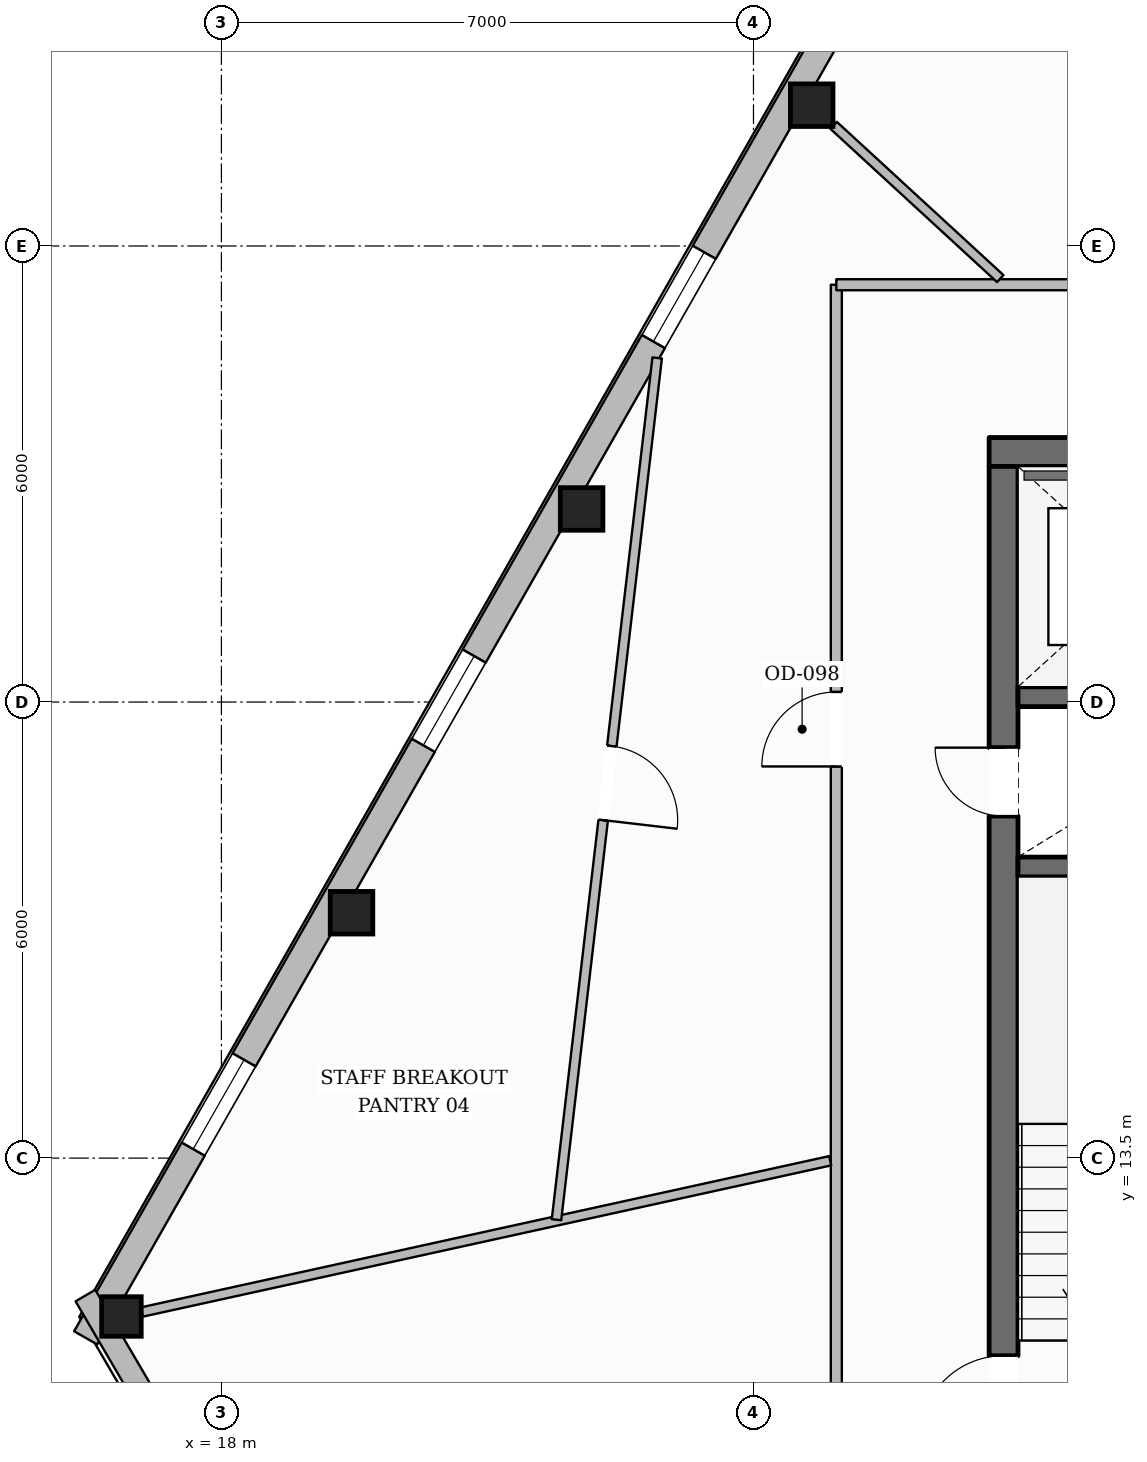
"""IFC4 building model, lengths in metres.
Left out: names, types, materials, properties, quantities, classifications, styles, units other than length and angle.
Written with IfcOpenShell. Run it as: python <this file> out.ifc"""

import sys

from ifc_helpers import new_model, si_unit, direction, frame, frame_2d, origin, origin_2d, place, context, subcontext, project, spatial, rectangle, hollow_rectangle, extrude, element, fill, save


model = new_model("IFC4")
c1 = context("Model", 3, precision=1e-05, world=origin(), true_north=direction((0.0, 1.0)))
c2 = subcontext(c1, "Body", "Model", "MODEL_VIEW")
j1 = project(units=[si_unit("LENGTHUNIT", "METRE"), si_unit("PLANEANGLEUNIT", "RADIAN")], contexts=[c1])
p1 = place(None, origin())
s1 = spatial("IfcSite", under=j1, at=p1, CompositionType="ELEMENT")
p2 = place(p1, origin())
s2 = spatial("IfcBuilding", under=s1, at=p2, CompositionType="ELEMENT")
p3 = place(p2, frame((0.0, 0.0, 251.05)))
s3 = spatial("IfcBuildingStorey", under=s2, at=p3, CompositionType="ELEMENT", Elevation=251.05)
p4 = place(p3, frame((28.1, 22.79, 0.0), z_axis=(0.0, 0.0, 1.0), x_axis=(1.0, 0.0, 0.0)))
e1 = element("IfcWall", 1, at=p4, inside=s3, PredefinedType="SOLIDWALL", context=c2, shape_type="SweptSolid", body=[
    extrude(rectangle(XDim=19.8, YDim=0.38, at=frame_2d((9.9, 0.0))), origin(), (0.0, 0.0, 1.0), 3.61),
])
p5 = place(p4, frame((6.175, 0.0, 0.0)))
e2 = element("IfcOpeningElement", 2, at=p5, cuts=e1, PredefinedType="OPENING", context=c2, shape_type="SweptSolid", body=[
    extrude(rectangle(XDim=1.05, YDim=2.15, at=frame_2d((0.525, 1.075))), frame((0.0, 0.2, 0.0), z_axis=(0.0, -1.0, 0.0), x_axis=(1.0, 0.0, 0.0)), (0.0, 0.0, 1.0), 0.4),
])
p6 = place(p4, frame((12.575, 0.0, 0.0)))
e3 = element("IfcOpeningElement", 3, at=p6, cuts=e1, PredefinedType="OPENING", context=c2, shape_type="SweptSolid", body=[
    extrude(rectangle(XDim=1.05, YDim=2.15, at=frame_2d((0.525, 1.075))), frame((0.0, 0.2, 0.0), z_axis=(0.0, -1.0, 0.0), x_axis=(1.0, 0.0, 0.0)), (0.0, 0.0, 1.0), 0.4),
])
p7 = place(p3, frame((28.29, 9.6, 0.0), z_axis=(0.0, 0.0, 1.0), x_axis=(0.0, 1.0, 0.0)))
e4 = element("IfcWall", 4, at=p7, inside=s3, PredefinedType="SOLIDWALL", context=c2, shape_type="SweptSolid", body=[
    extrude(rectangle(XDim=13.0, YDim=0.38, at=frame_2d((6.5, 0.0))), origin(), (0.0, 0.0, 1.0), 3.61),
])
p8 = place(p7, frame((0.2, 0.0, 0.0)))
e5 = element("IfcOpeningElement", 5, at=p8, cuts=e4, PredefinedType="OPENING", context=c2, shape_type="SweptSolid", body=[
    extrude(rectangle(XDim=1.1, YDim=2.15, at=frame_2d((0.55, 1.075))), frame((0.0, 0.2, 0.0), z_axis=(0.0, -1.0, 0.0), x_axis=(1.0, 0.0, 0.0)), (0.0, 0.0, 1.0), 0.4),
])
p9 = place(p7, frame((8.4, 0.0, 0.0)))
e6 = element("IfcOpeningElement", 6, at=p9, cuts=e4, PredefinedType="OPENING", context=c2, shape_type="SweptSolid", body=[
    extrude(rectangle(XDim=0.9, YDim=2.1, at=frame_2d((0.45, 1.05))), frame((0.0, 0.2, 0.0), z_axis=(0.0, -1.0, 0.0), x_axis=(1.0, 0.0, 0.0)), (0.0, 0.0, 1.0), 0.4),
])
for number, where, z_axis, x_axis in (
    (7, (28.48, 17.33, 0.0), (0.0, 0.0, 1.0), (1.0, 0.0, 0.0)),
    (8, (28.48, 19.57, 0.0), (0.0, 0.0, 1.0), (1.0, 0.0, 0.0)),
):
    element("IfcWall", number, at=place(p3, frame(where, z_axis=z_axis, x_axis=x_axis)), inside=s3, PredefinedType="SHEAR", context=c2, shape_type="SweptSolid", body=[
        extrude(rectangle(XDim=3.2, YDim=0.26, at=frame_2d((1.6, 0.0))), origin(), (0.0, 0.0, 1.0), 3.61),
    ])
for number, where, z_axis, x_axis in (
    (9, (25.766, 27.352, 0.0), (0.0, 0.0, 1.0), (1.0, 0.0, 0.0)),
    (10, (22.739, 22.04, 0.0), (0.0, 0.0, 1.0), (1.0, 0.0, 0.0)),
    (11, (19.712, 16.728, 0.0), (0.0, 0.0, 1.0), (1.0, 0.0, 0.0)),
):
    element("IfcColumn", number, at=place(p3, frame(where, z_axis=z_axis, x_axis=x_axis)), inside=s3, PredefinedType="COLUMN", context=c2, shape_type="SweptSolid", body=[
        extrude(hollow_rectangle(XDim=0.56, YDim=0.56, WallThickness=0.025, at=origin_2d()), origin(), (0.0, 0.0, 1.0), 3.61),
    ])
p10 = place(p3, frame((16.685, 11.416, 0.0), z_axis=(0.0, 0.0, 1.0), x_axis=(1.0, 0.0, 0.0)))
e12 = element("IfcColumn", 12, at=p10, inside=s3, PredefinedType="COLUMN", context=c2, shape_type="SweptSolid", body=[
    extrude(hollow_rectangle(XDim=0.52, YDim=0.52, WallThickness=0.024, at=origin_2d()), origin(), (0.0, 0.0, 1.0), 3.61),
])
p11 = place(p3, frame((16.214, 11.135, 0.0), z_axis=(0.0, 0.0, 1.0), x_axis=(0.49510347201, 0.868834018673, 0.0)))
e13 = element("IfcWall", 13, at=p11, inside=s3, PredefinedType="STANDARD", context=c2, shape_type="SweptSolid", body=[
    extrude(rectangle(XDim=37.643, YDim=0.35, at=frame_2d((18.822, 0.0))), origin(), (0.0, 0.0, 1.0), 3.196),
])
p12 = place(p11, frame((33.429, 0.0, 0.65)))
e14 = element("IfcOpeningElement", 14, at=p12, cuts=e13, PredefinedType="OPENING", context=c2, shape_type="SweptSolid", body=[
    extrude(rectangle(XDim=1.35, YDim=1.75, at=frame_2d((0.675, 0.875))), frame((0.0, 0.185, 0.0), z_axis=(0.0, -1.0, 0.0), x_axis=(1.0, 0.0, 0.0)), (0.0, 0.0, 1.0), 0.37),
])
p13 = place(p11, frame((27.315, 0.0, 0.65)))
e15 = element("IfcOpeningElement", 15, at=p13, cuts=e13, PredefinedType="OPENING", context=c2, shape_type="SweptSolid", body=[
    extrude(rectangle(XDim=1.35, YDim=1.75, at=frame_2d((0.675, 0.875))), frame((0.0, 0.185, 0.0), z_axis=(0.0, -1.0, 0.0), x_axis=(1.0, 0.0, 0.0)), (0.0, 0.0, 1.0), 0.37),
])
p14 = place(p11, frame((15.087, 0.0, 0.65)))
e16 = element("IfcOpeningElement", 16, at=p14, cuts=e13, PredefinedType="OPENING", context=c2, shape_type="SweptSolid", body=[
    extrude(rectangle(XDim=1.35, YDim=1.75, at=frame_2d((0.675, 0.875))), frame((0.0, 0.185, 0.0), z_axis=(0.0, -1.0, 0.0), x_axis=(1.0, 0.0, 0.0)), (0.0, 0.0, 1.0), 0.37),
])
p15 = place(p11, frame((8.973, 0.0, 0.65)))
e17 = element("IfcOpeningElement", 17, at=p15, cuts=e13, PredefinedType="OPENING", context=c2, shape_type="SweptSolid", body=[
    extrude(rectangle(XDim=1.35, YDim=1.75, at=frame_2d((0.675, 0.875))), frame((0.0, 0.185, 0.0), z_axis=(0.0, -1.0, 0.0), x_axis=(1.0, 0.0, 0.0)), (0.0, 0.0, 1.0), 0.37),
])
p16 = place(p11, frame((2.859, 0.0, 0.65)))
e18 = element("IfcOpeningElement", 18, at=p16, cuts=e13, PredefinedType="OPENING", context=c2, shape_type="SweptSolid", body=[
    extrude(rectangle(XDim=1.35, YDim=1.75, at=frame_2d((0.675, 0.875))), frame((0.0, 0.185, 0.0), z_axis=(0.0, -1.0, 0.0), x_axis=(1.0, 0.0, 0.0)), (0.0, 0.0, 1.0), 0.37),
])
p17 = place(p3, frame((19.979, 5.248, 0.0), z_axis=(0.0, 0.0, 1.0), x_axis=(-0.50480008765, 0.863236277915, 0.0)))
e19 = element("IfcWall", 19, at=p17, inside=s3, PredefinedType="STANDARD", context=c2, shape_type="SweptSolid", body=[
    extrude(rectangle(XDim=7.464, YDim=0.3, at=frame_2d((3.732, 0.0))), origin(), (0.0, 0.0, 1.0), 3.196),
])
p18 = place(p17, frame((3.207, 0.0, 0.65)))
e20 = element("IfcOpeningElement", 20, at=p18, cuts=e19, PredefinedType="OPENING", context=c2, shape_type="SweptSolid", body=[
    extrude(rectangle(XDim=1.05, YDim=1.7, at=frame_2d((0.525, 0.85))), frame((0.0, 0.16, 0.0), z_axis=(0.0, -1.0, 0.0), x_axis=(1.0, 0.0, 0.0)), (0.0, 0.0, 1.0), 0.32),
])
p19 = place(p3, frame((26.09, 7.21, 0.0), z_axis=(0.0, 0.0, 1.0), x_axis=(0.0, 1.0, 0.0)))
e21 = element("IfcWall", 21, at=p19, inside=s3, PredefinedType="PARTITIONING", context=c2, shape_type="SweptSolid", body=[
    extrude(rectangle(XDim=17.78, YDim=0.145, at=frame_2d((8.89, 0.0))), origin(), (0.0, 0.0, 1.0), 3.349),
])
p20 = place(p19, frame((11.443, 0.0, 0.0)))
e22 = element("IfcOpeningElement", 22, at=p20, cuts=e21, PredefinedType="OPENING", context=c2, shape_type="SweptSolid", body=[
    extrude(rectangle(XDim=0.98, YDim=2.15, at=frame_2d((0.49, 1.075))), frame((0.0, 0.083, 0.0), z_axis=(0.0, -1.0, 0.0), x_axis=(1.0, 0.0, 0.0)), (0.0, 0.0, 1.0), 0.165),
])
p21 = place(p3, frame((26.09, 24.99, 0.0), z_axis=(0.0, 0.0, 1.0), x_axis=(1.0, 0.0, 0.0)))
e23 = element("IfcWall", 23, at=p21, inside=s3, PredefinedType="PARTITIONING", context=c2, shape_type="SweptSolid", body=[
    extrude(rectangle(XDim=17.11, YDim=0.145, at=frame_2d((8.555, 0.0))), origin(), (0.0, 0.0, 1.0), 3.61),
])
p22 = place(p21, frame((8.47, 0.0, 0.0)))
e24 = element("IfcOpeningElement", 24, at=p22, cuts=e23, PredefinedType="OPENING", context=c2, shape_type="SweptSolid", body=[
    extrude(rectangle(XDim=0.88, YDim=2.1, at=frame_2d((0.44, 1.05))), frame((0.0, 0.083, 0.0), z_axis=(0.0, -1.0, 0.0), x_axis=(1.0, 0.0, 0.0)), (0.0, 0.0, 1.0), 0.165),
])
p23 = place(p21, frame((10.99, 0.0, 0.0)))
e25 = element("IfcOpeningElement", 25, at=p23, cuts=e23, PredefinedType="OPENING", context=c2, shape_type="SweptSolid", body=[
    extrude(rectangle(XDim=0.88, YDim=2.1, at=frame_2d((0.44, 1.05))), frame((0.0, 0.083, 0.0), z_axis=(0.0, -1.0, 0.0), x_axis=(1.0, 0.0, 0.0)), (0.0, 0.0, 1.0), 0.165),
])
p24 = place(p21, frame((13.37, 0.0, 0.0)))
e26 = element("IfcOpeningElement", 26, at=p24, cuts=e23, PredefinedType="OPENING", context=c2, shape_type="SweptSolid", body=[
    extrude(rectangle(XDim=0.96, YDim=2.1, at=frame_2d((0.48, 1.05))), frame((0.0, 0.083, 0.0), z_axis=(0.0, -1.0, 0.0), x_axis=(1.0, 0.0, 0.0)), (0.0, 0.0, 1.0), 0.165),
])
p25 = place(p21, frame((4.257, 0.0, 0.0)))
e27 = element("IfcOpeningElement", 27, at=p25, cuts=e23, PredefinedType="OPENING", context=c2, shape_type="SweptSolid", body=[
    extrude(rectangle(XDim=1.4, YDim=2.2, at=frame_2d((0.7, 1.1))), frame((0.0, 0.083, 0.0), z_axis=(0.0, -1.0, 0.0), x_axis=(1.0, 0.0, 0.0)), (0.0, 0.0, 1.0), 0.165),
])
p26 = place(p3, frame((28.247, 25.071, 0.0), z_axis=(0.0, 0.0, 1.0), x_axis=(-0.736030630255, 0.67694823386, 0.0)))
e28 = element("IfcWall", 28, at=p26, inside=s3, PredefinedType="PARTITIONING", context=c2, shape_type="SweptSolid", body=[
    extrude(rectangle(XDim=2.979, YDim=0.125, at=frame_2d((1.49, 0.0))), origin(), (0.0, 0.0, 1.0), 3.61),
])
p27 = place(p3, frame((26.01, 13.465, 0.0), z_axis=(0.0, 0.0, 1.0), x_axis=(-0.976700346334, -0.214607626778, 0.0)))
e29 = element("IfcWall", 29, at=p27, inside=s3, PredefinedType="PARTITIONING", context=c2, shape_type="SweptSolid", body=[
    extrude(rectangle(XDim=9.273, YDim=0.125, at=frame_2d((4.636, 0.0))), origin(), (0.0, 0.0, 1.0), 3.246),
])
p28 = place(p3, frame((23.733, 24.027, 0.0), z_axis=(0.0, 0.0, 1.0), x_axis=(-0.116028401935, -0.993245896012, 0.0)))
e30 = element("IfcWall", 30, at=p28, inside=s3, PredefinedType="PARTITIONING", context=c2, shape_type="SweptSolid", body=[
    extrude(rectangle(XDim=11.415, YDim=0.125, at=frame_2d((5.708, 0.0))), origin(), (0.0, 0.0, 1.0), 3.199),
])
p29 = place(p28, frame((5.142, 0.0, 0.0)))
e31 = element("IfcOpeningElement", 31, at=p29, cuts=e30, PredefinedType="OPENING", context=c2, shape_type="SweptSolid", body=[
    extrude(rectangle(XDim=0.98, YDim=2.15, at=frame_2d((0.49, 1.075))), frame((0.0, 0.073, 0.0), z_axis=(0.0, -1.0, 0.0), x_axis=(1.0, 0.0, 0.0)), (0.0, 0.0, 1.0), 0.145),
])
p30 = place(p14, origin())
e32 = element("IfcWindow", 32, at=p30, inside=s3, PartitioningType="SINGLE_PANEL", PredefinedType="WINDOW", context=c2, shape_type="SweptSolid", body=[
    extrude(rectangle(XDim=1.35, YDim=1.75, at=frame_2d((0.675, 0.875))), frame((0.0, 0.03, 0.0), z_axis=(0.0, -1.0, 0.0), x_axis=(1.0, 0.0, 0.0)), (0.0, 0.0, 1.0), 0.06),
])
fill(e16, e32)
p31 = place(p15, origin())
e33 = element("IfcWindow", 33, at=p31, inside=s3, PartitioningType="SINGLE_PANEL", PredefinedType="WINDOW", context=c2, shape_type="SweptSolid", body=[
    extrude(rectangle(XDim=1.35, YDim=1.75, at=frame_2d((0.675, 0.875))), frame((0.0, 0.03, 0.0), z_axis=(0.0, -1.0, 0.0), x_axis=(1.0, 0.0, 0.0)), (0.0, 0.0, 1.0), 0.06),
])
fill(e17, e33)
p32 = place(p16, origin())
e34 = element("IfcWindow", 34, at=p32, inside=s3, PartitioningType="SINGLE_PANEL", PredefinedType="WINDOW", context=c2, shape_type="SweptSolid", body=[
    extrude(rectangle(XDim=1.35, YDim=1.75, at=frame_2d((0.675, 0.875))), frame((0.0, 0.03, 0.0), z_axis=(0.0, -1.0, 0.0), x_axis=(1.0, 0.0, 0.0)), (0.0, 0.0, 1.0), 0.06),
])
fill(e18, e34)
p33 = place(p8, origin())
e35 = element("IfcDoor", 35, at=p33, inside=s3, OperationType="SINGLE_SWING_LEFT", PredefinedType="DOOR", context=c2, shape_type="SweptSolid", body=[
    extrude(rectangle(XDim=1.1, YDim=2.15, at=frame_2d((0.55, 1.075))), frame((0.0, 0.025, 0.0), z_axis=(0.0, -1.0, 0.0), x_axis=(1.0, 0.0, 0.0)), (0.0, 0.0, 1.0), 0.05),
])
fill(e5, e35)
p34 = place(p9, origin())
e36 = element("IfcDoor", 36, at=p34, inside=s3, OperationType="SINGLE_SWING_RIGHT", PredefinedType="DOOR", context=c2, shape_type="SweptSolid", body=[
    extrude(rectangle(XDim=0.9, YDim=2.1, at=frame_2d((0.45, 1.05))), frame((0.0, 0.025, 0.0), z_axis=(0.0, -1.0, 0.0), x_axis=(1.0, 0.0, 0.0)), (0.0, 0.0, 1.0), 0.05),
])
fill(e6, e36)
p35 = place(p20, origin())
e37 = element("IfcDoor", 37, at=p35, inside=s3, OperationType="SINGLE_SWING_LEFT", PredefinedType="DOOR", context=c2, shape_type="SweptSolid", body=[
    extrude(rectangle(XDim=0.98, YDim=2.15, at=frame_2d((0.49, 1.075))), frame((0.0, 0.025, 0.0), z_axis=(0.0, -1.0, 0.0), x_axis=(1.0, 0.0, 0.0)), (0.0, 0.0, 1.0), 0.05),
])
fill(e22, e37)
p36 = place(p29, origin())
e38 = element("IfcDoor", 38, at=p36, inside=s3, OperationType="SINGLE_SWING_RIGHT", PredefinedType="DOOR", context=c2, shape_type="SweptSolid", body=[
    extrude(rectangle(XDim=0.98, YDim=2.15, at=frame_2d((0.49, 1.075))), frame((0.0, 0.025, 0.0), z_axis=(0.0, -1.0, 0.0), x_axis=(1.0, 0.0, 0.0)), (0.0, 0.0, 1.0), 0.05),
])
fill(e31, e38)
save(model, sys.argv[1])
